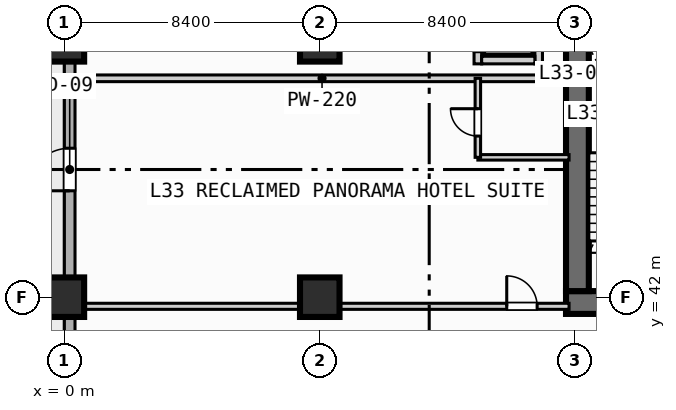
"""IFC4 building model, lengths in metres.
Left out: names, types, materials, properties, quantities, classifications, styles, units other than length and angle.
Written with IfcOpenShell. Run it as: python <this file> out.ifc"""

import sys

from ifc_helpers import new_model, si_unit, direction, frame, frame_2d, origin, origin_2d, place, context, subcontext, project, spatial, rectangle, extrude, element, fill, save


model = new_model("IFC4")
c1 = context("Model", 3, precision=1e-05, world=origin(), true_north=direction((0.0, 1.0)))
c2 = subcontext(c1, "Body", "Model", "MODEL_VIEW")
j1 = project(units=[si_unit("LENGTHUNIT", "METRE"), si_unit("PLANEANGLEUNIT", "RADIAN")], contexts=[c1])
p1 = place(None, origin())
s1 = spatial("IfcSite", under=j1, at=p1, CompositionType="ELEMENT")
p2 = place(p1, origin())
s2 = spatial("IfcBuilding", under=s1, at=p2, CompositionType="ELEMENT")
p3 = place(p2, frame((0.0, 0.0, 138.0)))
s3 = spatial("IfcBuildingStorey", under=s2, at=p3, CompositionType="ELEMENT", Elevation=138.0)
p4 = place(p3, frame((16.5, 41.825, 0.0), z_axis=(0.0, 0.0, 1.0), x_axis=(1.0, 0.0, 0.0)))
e1 = element("IfcWall", 1, at=p4, inside=s3, PredefinedType="SHEAR", context=c2, shape_type="SweptSolid", body=[
    extrude(rectangle(XDim=1.5, YDim=0.75, at=frame_2d((0.75, 0.0))), origin(), (0.0, 0.0, 1.0), 3.55),
])
p5 = place(p3, frame((16.875, 42.2, 0.0), z_axis=(0.0, 0.0, 1.0), x_axis=(0.0, 1.0, 0.0)))
e2 = element("IfcWall", 2, at=p5, inside=s3, PredefinedType="SHEAR", context=c2, shape_type="SweptSolid", body=[
    extrude(rectangle(XDim=16.35, YDim=0.75, at=frame_2d((8.175, 0.0))), origin(), (0.0, 0.0, 1.0), 3.55),
])
for number, where, z_axis, x_axis in (
    (3, (0.0, 42.0, 0.0), (0.0, 0.0, 1.0), (1.0, 0.0, 0.0)),
    (4, (0.0, 50.4, 0.0), (0.0, 0.0, 1.0), (1.0, 0.0, 0.0)),
    (5, (8.4, 42.0, 0.0), (0.0, 0.0, 1.0), (1.0, 0.0, 0.0)),
    (6, (8.4, 50.4, 0.0), (0.0, 0.0, 1.0), (1.0, 0.0, 0.0)),
):
    element("IfcColumn", number, at=place(p3, frame(where, z_axis=z_axis, x_axis=x_axis)), inside=s3, PredefinedType="COLUMN", context=c2, shape_type="SweptSolid", body=[
        extrude(rectangle(XDim=1.3, YDim=1.3, at=origin_2d()), origin(), (0.0, 0.0, 1.0), 3.8),
    ])
p6 = place(p3, frame((0.175, 3.175, 0.0), z_axis=(0.0, 0.0, 1.0), x_axis=(0.0, 1.0, 0.0)))
e7 = element("IfcWall", 7, at=p6, inside=s3, PredefinedType="STANDARD", context=c2, shape_type="SweptSolid", body=[
    extrude(rectangle(XDim=86.05, YDim=0.35, at=frame_2d((43.025, 0.0))), origin(), (0.0, 0.0, 1.0), 3.55),
])
p7 = place(p6, frame((42.325, 0.0, 0.0)))
e8 = element("IfcOpeningElement", 8, at=p7, cuts=e7, PredefinedType="OPENING", context=c2, shape_type="SweptSolid", body=[
    extrude(rectangle(XDim=1.4, YDim=2.2, at=frame_2d((0.7, 1.1))), frame((0.0, 0.185, 0.0), z_axis=(0.0, -1.0, 0.0), x_axis=(1.0, 0.0, 0.0)), (0.0, 0.0, 1.0), 0.37),
])
p8 = place(p6, frame((25.125, 0.0, 0.85)))
e9 = element("IfcOpeningElement", 9, at=p8, cuts=e7, PredefinedType="OPENING", context=c2, shape_type="SweptSolid", body=[
    extrude(rectangle(XDim=2.2, YDim=1.8, at=frame_2d((1.1, 0.9))), frame((0.0, 0.185, 0.0), z_axis=(0.0, -1.0, 0.0), x_axis=(1.0, 0.0, 0.0)), (0.0, 0.0, 1.0), 0.37),
])
p9 = place(p6, frame((33.525, 0.0, 0.85)))
e10 = element("IfcOpeningElement", 10, at=p9, cuts=e7, PredefinedType="OPENING", context=c2, shape_type="SweptSolid", body=[
    extrude(rectangle(XDim=2.2, YDim=1.8, at=frame_2d((1.1, 0.9))), frame((0.0, 0.185, 0.0), z_axis=(0.0, -1.0, 0.0), x_axis=(1.0, 0.0, 0.0)), (0.0, 0.0, 1.0), 0.37),
])
p10 = place(p3, frame((13.6, 49.675, 0.0), z_axis=(0.0, 0.0, 1.0), x_axis=(0.0, 1.0, 0.0)))
e11 = element("IfcWall", 11, at=p10, inside=s3, PredefinedType="SOLIDWALL", context=c2, shape_type="SweptSolid", body=[
    extrude(rectangle(XDim=2.75, YDim=0.25, at=frame_2d((1.375, 0.0))), origin(), (0.0, 0.0, 1.0), 3.55),
])
p11 = place(p10, frame((0.4, 0.0, 0.0)))
e12 = element("IfcOpeningElement", 12, at=p11, cuts=e11, PredefinedType="OPENING", context=c2, shape_type="SweptSolid", body=[
    extrude(rectangle(XDim=1.1, YDim=2.15, at=frame_2d((0.55, 1.075))), frame((0.0, 0.135, 0.0), z_axis=(0.0, -1.0, 0.0), x_axis=(1.0, 0.0, 0.0)), (0.0, 0.0, 1.0), 0.27),
])
p12 = place(p3, frame((15.6, 49.675, 0.0), z_axis=(0.0, 0.0, 1.0), x_axis=(0.0, 1.0, 0.0)))
e13 = element("IfcWall", 13, at=p12, inside=s3, PredefinedType="SOLIDWALL", context=c2, shape_type="SweptSolid", body=[
    extrude(rectangle(XDim=2.75, YDim=0.25, at=frame_2d((1.375, 0.0))), origin(), (0.0, 0.0, 1.0), 3.55),
])
p13 = place(p3, frame((13.725, 49.8, 0.0), z_axis=(0.0, 0.0, 1.0), x_axis=(1.0, 0.0, 0.0)))
e14 = element("IfcWall", 14, at=p13, inside=s3, PredefinedType="SOLIDWALL", context=c2, shape_type="SweptSolid", body=[
    extrude(rectangle(XDim=1.75, YDim=0.25, at=frame_2d((0.875, 0.0))), origin(), (0.0, 0.0, 1.0), 3.55),
])
p14 = place(p3, frame((0.35, 41.7, 0.0), z_axis=(0.0, 0.0, 1.0), x_axis=(1.0, 0.0, 0.0)))
e15 = element("IfcWall", 15, at=p14, inside=s3, PredefinedType="PARTITIONING", context=c2, shape_type="SweptSolid", body=[
    extrude(rectangle(XDim=16.25, YDim=0.2, at=frame_2d((8.125, 0.0))), origin(), (0.0, 0.0, 1.0), 2.8),
])
p15 = place(p14, frame((14.2, 0.0, 0.0)))
e16 = element("IfcOpeningElement", 16, at=p15, cuts=e15, PredefinedType="OPENING", context=c2, shape_type="SweptSolid", body=[
    extrude(rectangle(XDim=1.0, YDim=2.15, at=frame_2d((0.5, 1.075))), frame((0.0, 0.11, 0.0), z_axis=(0.0, -1.0, 0.0), x_axis=(1.0, 0.0, 0.0)), (0.0, 0.0, 1.0), 0.22),
])
p16 = place(p3, frame((0.35, 49.2, 0.0), z_axis=(0.0, 0.0, 1.0), x_axis=(1.0, 0.0, 0.0)))
e17 = element("IfcWall", 17, at=p16, inside=s3, PredefinedType="PARTITIONING", context=c2, shape_type="SweptSolid", body=[
    extrude(rectangle(XDim=16.25, YDim=0.22, at=frame_2d((8.125, 0.0))), origin(), (0.0, 0.0, 1.0), 3.55),
])
p17 = place(p3, frame((13.6, 46.6, 0.0), z_axis=(0.0, 0.0, 1.0), x_axis=(1.0, 0.0, 0.0)))
e18 = element("IfcWall", 18, at=p17, inside=s3, PredefinedType="PLUMBINGWALL", context=c2, shape_type="SweptSolid", body=[
    extrude(rectangle(XDim=3.0, YDim=0.18, at=frame_2d((1.5, 0.0))), origin(), (0.0, 0.0, 1.0), 3.55),
])
p18 = place(p3, frame((13.6, 46.6, 0.0), z_axis=(0.0, 0.0, 1.0), x_axis=(0.0, 1.0, 0.0)))
e19 = element("IfcWall", 19, at=p18, inside=s3, PredefinedType="PLUMBINGWALL", context=c2, shape_type="SweptSolid", body=[
    extrude(rectangle(XDim=2.6, YDim=0.18, at=frame_2d((1.3, 0.0))), origin(), (0.0, 0.0, 1.0), 3.55),
])
p19 = place(p18, frame((0.7, 0.0, 0.0)))
e20 = element("IfcOpeningElement", 20, at=p19, cuts=e19, PredefinedType="OPENING", context=c2, shape_type="SweptSolid", body=[
    extrude(rectangle(XDim=0.9, YDim=2.1, at=frame_2d((0.45, 1.05))), frame((0.0, 0.1, 0.0), z_axis=(0.0, -1.0, 0.0), x_axis=(1.0, 0.0, 0.0)), (0.0, 0.0, 1.0), 0.2),
])
p20 = place(p7, origin())
e21 = element("IfcDoor", 21, at=p20, inside=s3, OperationType="SINGLE_SWING_LEFT", PredefinedType="DOOR", context=c2, shape_type="SweptSolid", body=[
    extrude(rectangle(XDim=1.4, YDim=2.2, at=frame_2d((0.7, 1.1))), frame((0.0, 0.025, 0.0), z_axis=(0.0, -1.0, 0.0), x_axis=(1.0, 0.0, 0.0)), (0.0, 0.0, 1.0), 0.05),
])
fill(e8, e21)
p21 = place(p15, origin())
e22 = element("IfcDoor", 22, at=p21, inside=s3, OperationType="SINGLE_SWING_LEFT", PredefinedType="DOOR", context=c2, shape_type="SweptSolid", body=[
    extrude(rectangle(XDim=1.0, YDim=2.15, at=frame_2d((0.5, 1.075))), frame((0.0, 0.025, 0.0), z_axis=(0.0, -1.0, 0.0), x_axis=(1.0, 0.0, 0.0)), (0.0, 0.0, 1.0), 0.05),
])
fill(e16, e22)
p22 = place(p19, origin())
e23 = element("IfcDoor", 23, at=p22, inside=s3, OperationType="SINGLE_SWING_RIGHT", PredefinedType="DOOR", context=c2, shape_type="SweptSolid", body=[
    extrude(rectangle(XDim=0.9, YDim=2.1, at=frame_2d((0.45, 1.05))), frame((0.0, 0.025, 0.0), z_axis=(0.0, -1.0, 0.0), x_axis=(1.0, 0.0, 0.0)), (0.0, 0.0, 1.0), 0.05),
])
fill(e20, e23)
save(model, sys.argv[1])
